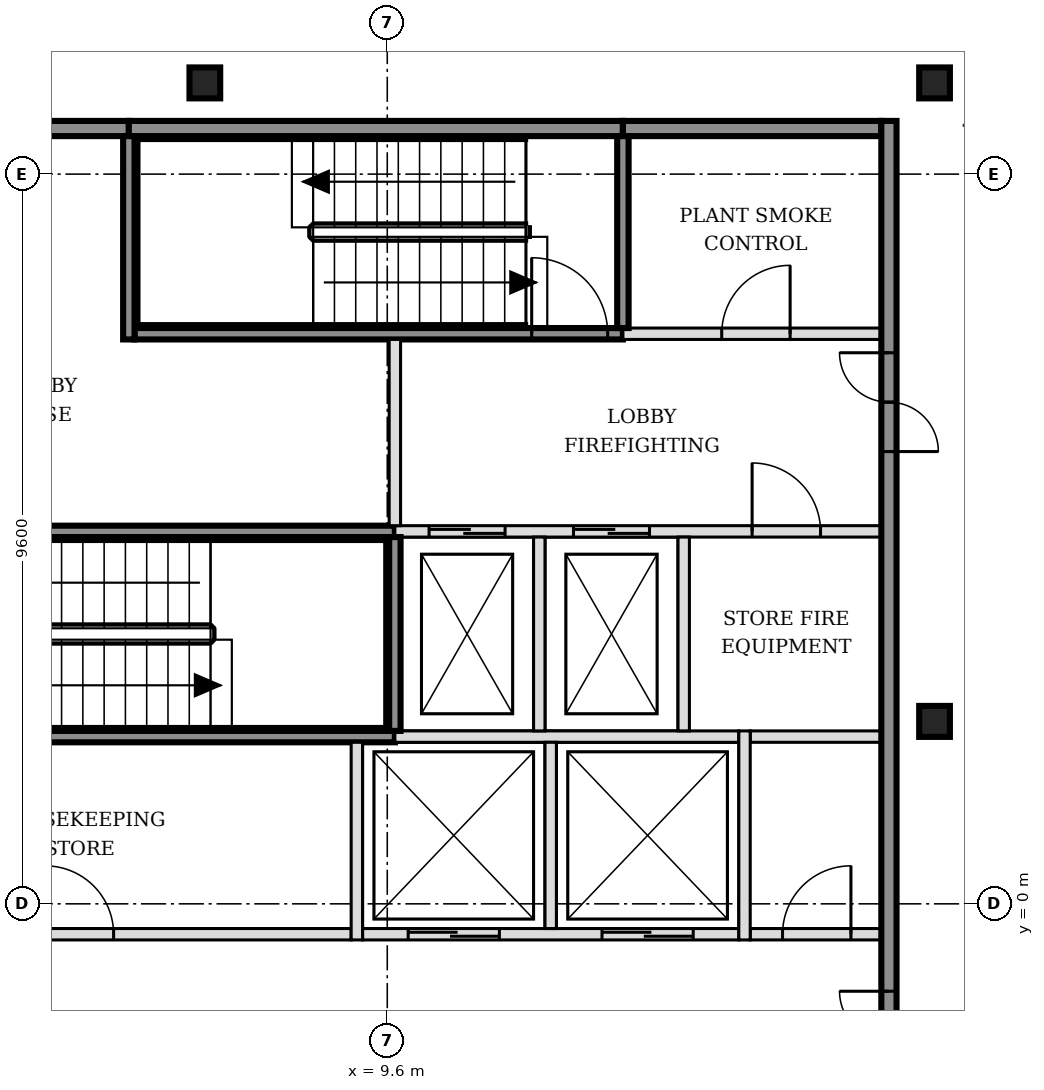
"""IFC4 building model, lengths in metres.
Left out: names, types, materials, properties, quantities, classifications, styles, units other than length and angle.
Written with IfcOpenShell. Run it as: python <this file> out.ifc"""

import sys

from ifc_helpers import new_model, si_unit, direction, frame, frame_2d, origin, origin_2d, place, context, subcontext, project, spatial, rectangle, i_section, extrude, element, fill, save


model = new_model("IFC4")
c1 = context("Model", 3, precision=1e-05, world=origin(), true_north=direction((0.0, 1.0)))
c2 = subcontext(c1, "Body", "Model", "MODEL_VIEW")
j1 = project(units=[si_unit("LENGTHUNIT", "METRE"), si_unit("PLANEANGLEUNIT", "RADIAN")], contexts=[c1])
p1 = place(None, origin())
s1 = spatial("IfcSite", under=j1, at=p1, CompositionType="ELEMENT")
p2 = place(p1, origin())
s2 = spatial("IfcBuilding", under=s1, at=p2, CompositionType="ELEMENT")
p3 = place(p2, frame((0.0, 0.0, 228.6)))
s3 = spatial("IfcBuildingStorey", under=s2, at=p3, CompositionType="ELEMENT", Elevation=228.6)
for number, where, z_axis, x_axis in (
    (1, (16.8, 2.4, -0.15), (0.0, 0.0, 1.0), (1.0, 0.0, 0.0)),
    (2, (7.2, 10.8, -0.15), (0.0, 0.0, 1.0), (1.0, 0.0, 0.0)),
    (3, (16.8, 10.8, -0.15), (0.0, 0.0, 1.0), (1.0, 0.0, 0.0)),
):
    element("IfcColumn", number, at=place(p3, frame(where, z_axis=z_axis, x_axis=x_axis)), inside=s3, PredefinedType="COLUMN", context=c2, shape_type="SweptSolid", body=[
        extrude(i_section(OverallWidth=0.404, OverallDepth=0.407, WebThickness=0.027, FlangeThickness=0.044, FilletRadius=0.015, at=origin_2d()), origin(), (0.0, 0.0, 1.0), 3.6),
    ])
p4 = place(p3, frame((-1.7, -0.4, 0.0), z_axis=(0.0, 0.0, 1.0), x_axis=(1.0, 0.0, 0.0)))
e4 = element("IfcWall", 4, at=p4, inside=s3, PredefinedType="PARTITIONING", context=c2, shape_type="SweptSolid", body=[
    extrude(rectangle(XDim=10.825, YDim=0.15, at=frame_2d((5.413, 0.0))), origin(), (0.0, 0.0, 1.0), 3.45),
])
p5 = place(p4, frame((1.3, 0.0, 0.0)))
e5 = element("IfcOpeningElement", 5, at=p5, cuts=e4, PredefinedType="OPENING", context=c2, shape_type="SweptSolid", body=[
    extrude(rectangle(XDim=0.9, YDim=2.1, at=frame_2d((0.45, 1.05))), frame((0.0, 0.085, 0.0), z_axis=(0.0, -1.0, 0.0), x_axis=(1.0, 0.0, 0.0)), (0.0, 0.0, 1.0), 0.17),
])
p6 = place(p4, frame((6.8, 0.0, 0.0)))
e6 = element("IfcOpeningElement", 6, at=p6, cuts=e4, PredefinedType="OPENING", context=c2, shape_type="SweptSolid", body=[
    extrude(rectangle(XDim=0.9, YDim=2.1, at=frame_2d((0.45, 1.05))), frame((0.0, 0.085, 0.0), z_axis=(0.0, -1.0, 0.0), x_axis=(1.0, 0.0, 0.0)), (0.0, 0.0, 1.0), 0.17),
])
p7 = place(p3, frame((9.275, -0.4, 0.0), z_axis=(0.0, 0.0, 1.0), x_axis=(1.0, 0.0, 0.0)))
e7 = element("IfcWall", 7, at=p7, inside=s3, PredefinedType="SOLIDWALL", context=c2, shape_type="SweptSolid", body=[
    extrude(rectangle(XDim=4.95, YDim=0.15, at=frame_2d((2.475, 0.0))), origin(), (0.0, 0.0, 1.0), 3.45),
])
p8 = place(p7, frame((0.6, 0.0, 0.0)))
e8 = element("IfcOpeningElement", 8, at=p8, cuts=e7, PredefinedType="OPENING", context=c2, shape_type="SweptSolid", body=[
    extrude(rectangle(XDim=1.2, YDim=2.1, at=frame_2d((0.6, 1.05))), frame((0.0, 0.085, 0.0), z_axis=(0.0, -1.0, 0.0), x_axis=(1.0, 0.0, 0.0)), (0.0, 0.0, 1.0), 0.17),
])
p9 = place(p7, frame((3.15, 0.0, 0.0)))
e9 = element("IfcOpeningElement", 9, at=p9, cuts=e7, PredefinedType="OPENING", context=c2, shape_type="SweptSolid", body=[
    extrude(rectangle(XDim=1.2, YDim=2.1, at=frame_2d((0.6, 1.05))), frame((0.0, 0.085, 0.0), z_axis=(0.0, -1.0, 0.0), x_axis=(1.0, 0.0, 0.0)), (0.0, 0.0, 1.0), 0.17),
])
p10 = place(p3, frame((14.375, -0.4, 0.0), z_axis=(0.0, 0.0, 1.0), x_axis=(1.0, 0.0, 0.0)))
e10 = element("IfcWall", 10, at=p10, inside=s3, PredefinedType="PARTITIONING", context=c2, shape_type="SweptSolid", body=[
    extrude(rectangle(XDim=1.725, YDim=0.15, at=frame_2d((0.863, 0.0))), origin(), (0.0, 0.0, 1.0), 3.45),
])
p11 = place(p10, frame((0.425, 0.0, 0.0)))
e11 = element("IfcOpeningElement", 11, at=p11, cuts=e10, PredefinedType="OPENING", context=c2, shape_type="SweptSolid", body=[
    extrude(rectangle(XDim=0.9, YDim=2.1, at=frame_2d((0.45, 1.05))), frame((0.0, 0.085, 0.0), z_axis=(0.0, -1.0, 0.0), x_axis=(1.0, 0.0, 0.0)), (0.0, 0.0, 1.0), 0.17),
])
p12 = place(p3, frame((3.2, 2.2, 0.0), z_axis=(0.0, 0.0, 1.0), x_axis=(1.0, 0.0, 0.0)))
e12 = element("IfcWall", 12, at=p12, inside=s3, PredefinedType="SOLIDWALL", context=c2, shape_type="SweptSolid", body=[
    extrude(rectangle(XDim=6.5, YDim=0.15, at=frame_2d((3.25, 0.0))), origin(), (0.0, 0.0, 1.0), 3.45),
])
p13 = place(p3, frame((9.7, 2.2, 0.0), z_axis=(0.0, 0.0, 1.0), x_axis=(1.0, 0.0, 0.0)))
e13 = element("IfcWall", 13, at=p13, inside=s3, PredefinedType="SOLIDWALL", context=c2, shape_type="SweptSolid", body=[
    extrude(rectangle(XDim=4.525, YDim=0.15, at=frame_2d((2.263, 0.0))), origin(), (0.0, 0.0, 1.0), 3.45),
])
p14 = place(p3, frame((14.375, 2.2, 0.0), z_axis=(0.0, 0.0, 1.0), x_axis=(1.0, 0.0, 0.0)))
e14 = element("IfcWall", 14, at=p14, inside=s3, PredefinedType="PARTITIONING", context=c2, shape_type="SweptSolid", body=[
    extrude(rectangle(XDim=1.725, YDim=0.15, at=frame_2d((0.863, 0.0))), origin(), (0.0, 0.0, 1.0), 3.45),
])
p15 = place(p3, frame((3.2, 4.9, 0.0), z_axis=(0.0, 0.0, 1.0), x_axis=(1.0, 0.0, 0.0)))
e15 = element("IfcWall", 15, at=p15, inside=s3, PredefinedType="SOLIDWALL", context=c2, shape_type="SweptSolid", body=[
    extrude(rectangle(XDim=6.5, YDim=0.15, at=frame_2d((3.25, 0.0))), origin(), (0.0, 0.0, 1.0), 3.45),
])
p16 = place(p15, frame((0.175, 0.0, 0.0)))
e16 = element("IfcOpeningElement", 16, at=p16, cuts=e15, PredefinedType="OPENING", context=c2, shape_type="SweptSolid", body=[
    extrude(rectangle(XDim=1.0, YDim=2.1, at=frame_2d((0.5, 1.05))), frame((0.0, 0.085, 0.0), z_axis=(0.0, -1.0, 0.0), x_axis=(1.0, 0.0, 0.0)), (0.0, 0.0, 1.0), 0.17),
])
p17 = place(p3, frame((9.7, 4.9, 0.0), z_axis=(0.0, 0.0, 1.0), x_axis=(1.0, 0.0, 0.0)))
e17 = element("IfcWall", 17, at=p17, inside=s3, PredefinedType="SOLIDWALL", context=c2, shape_type="SweptSolid", body=[
    extrude(rectangle(XDim=6.4, YDim=0.15, at=frame_2d((3.2, 0.0))), origin(), (0.0, 0.0, 1.0), 3.45),
])
p18 = place(p17, frame((0.45, 0.0, 0.0)))
e18 = element("IfcOpeningElement", 18, at=p18, cuts=e17, PredefinedType="OPENING", context=c2, shape_type="SweptSolid", body=[
    extrude(rectangle(XDim=1.0, YDim=2.1, at=frame_2d((0.5, 1.05))), frame((0.0, 0.085, 0.0), z_axis=(0.0, -1.0, 0.0), x_axis=(1.0, 0.0, 0.0)), (0.0, 0.0, 1.0), 0.17),
])
p19 = place(p17, frame((2.35, 0.0, 0.0)))
e19 = element("IfcOpeningElement", 19, at=p19, cuts=e17, PredefinedType="OPENING", context=c2, shape_type="SweptSolid", body=[
    extrude(rectangle(XDim=1.0, YDim=2.1, at=frame_2d((0.5, 1.05))), frame((0.0, 0.085, 0.0), z_axis=(0.0, -1.0, 0.0), x_axis=(1.0, 0.0, 0.0)), (0.0, 0.0, 1.0), 0.17),
])
p20 = place(p17, frame((4.7, 0.0, 0.0)))
e20 = element("IfcOpeningElement", 20, at=p20, cuts=e17, PredefinedType="OPENING", context=c2, shape_type="SweptSolid", body=[
    extrude(rectangle(XDim=0.9, YDim=2.1, at=frame_2d((0.45, 1.05))), frame((0.0, 0.085, 0.0), z_axis=(0.0, -1.0, 0.0), x_axis=(1.0, 0.0, 0.0)), (0.0, 0.0, 1.0), 0.17),
])
p21 = place(p3, frame((6.275, 7.5, 0.0), z_axis=(0.0, 0.0, 1.0), x_axis=(1.0, 0.0, 0.0)))
e21 = element("IfcWall", 21, at=p21, inside=s3, PredefinedType="SOLIDWALL", context=c2, shape_type="SweptSolid", body=[
    extrude(rectangle(XDim=6.425, YDim=0.15, at=frame_2d((3.212, 0.0))), origin(), (0.0, 0.0, 1.0), 3.45),
])
p22 = place(p21, frame((5.225, 0.0, 0.0)))
e22 = element("IfcOpeningElement", 22, at=p22, cuts=e21, PredefinedType="OPENING", context=c2, shape_type="SweptSolid", body=[
    extrude(rectangle(XDim=1.0, YDim=2.1, at=frame_2d((0.5, 1.05))), frame((0.0, 0.085, 0.0), z_axis=(0.0, -1.0, 0.0), x_axis=(1.0, 0.0, 0.0)), (0.0, 0.0, 1.0), 0.17),
])
p23 = place(p3, frame((12.7, 7.5, 0.0), z_axis=(0.0, 0.0, 1.0), x_axis=(1.0, 0.0, 0.0)))
e23 = element("IfcWall", 23, at=p23, inside=s3, PredefinedType="SOLIDWALL", context=c2, shape_type="SweptSolid", body=[
    extrude(rectangle(XDim=3.4, YDim=0.15, at=frame_2d((1.7, 0.0))), origin(), (0.0, 0.0, 1.0), 3.45),
])
p24 = place(p23, frame((1.3, 0.0, 0.0)))
e24 = element("IfcOpeningElement", 24, at=p24, cuts=e23, PredefinedType="OPENING", context=c2, shape_type="SweptSolid", body=[
    extrude(rectangle(XDim=0.9, YDim=2.1, at=frame_2d((0.45, 1.05))), frame((0.0, 0.085, 0.0), z_axis=(0.0, -1.0, 0.0), x_axis=(1.0, 0.0, 0.0)), (0.0, 0.0, 1.0), 0.17),
])
p25 = place(p3, frame((-1.7, 10.2, 0.0), z_axis=(0.0, 0.0, 1.0), x_axis=(1.0, 0.0, 0.0)))
e25 = element("IfcWall", 25, at=p25, inside=s3, PredefinedType="SOLIDWALL", context=c2, shape_type="SweptSolid", body=[
    extrude(rectangle(XDim=7.9, YDim=0.2, at=frame_2d((3.95, 0.0))), origin(), (0.0, 0.0, 1.0), 3.45),
])
p26 = place(p3, frame((6.2, 10.2, 0.0), z_axis=(0.0, 0.0, 1.0), x_axis=(1.0, 0.0, 0.0)))
e26 = element("IfcWall", 26, at=p26, inside=s3, PredefinedType="SOLIDWALL", context=c2, shape_type="SweptSolid", body=[
    extrude(rectangle(XDim=6.5, YDim=0.2, at=frame_2d((3.25, 0.0))), origin(), (0.0, 0.0, 1.0), 3.45),
])
p27 = place(p3, frame((12.7, 10.2, 0.0), z_axis=(0.0, 0.0, 1.0), x_axis=(1.0, 0.0, 0.0)))
e27 = element("IfcWall", 27, at=p27, inside=s3, PredefinedType="SOLIDWALL", context=c2, shape_type="SweptSolid", body=[
    extrude(rectangle(XDim=3.4, YDim=0.2, at=frame_2d((1.7, 0.0))), origin(), (0.0, 0.0, 1.0), 3.45),
])
p28 = place(p3, frame((6.2, 7.425, 0.0), z_axis=(0.0, 0.0, 1.0), x_axis=(0.0, 1.0, 0.0)))
e28 = element("IfcWall", 28, at=p28, inside=s3, PredefinedType="SOLIDWALL", context=c2, shape_type="SweptSolid", body=[
    extrude(rectangle(XDim=2.675, YDim=0.15, at=frame_2d((1.337, 0.0))), origin(), (0.0, 0.0, 1.0), 3.45),
])
p29 = place(p3, frame((9.2, -0.475, 0.0), z_axis=(0.0, 0.0, 1.0), x_axis=(0.0, 1.0, 0.0)))
e29 = element("IfcWall", 29, at=p29, inside=s3, PredefinedType="SOLIDWALL", context=c2, shape_type="SweptSolid", body=[
    extrude(rectangle(XDim=2.6, YDim=0.15, at=frame_2d((1.3, 0.0))), origin(), (0.0, 0.0, 1.0), 3.45),
])
p30 = place(p3, frame((9.7, 2.275, 0.0), z_axis=(0.0, 0.0, 1.0), x_axis=(0.0, 1.0, 0.0)))
e30 = element("IfcWall", 30, at=p30, inside=s3, PredefinedType="SOLIDWALL", context=c2, shape_type="SweptSolid", body=[
    extrude(rectangle(XDim=2.55, YDim=0.15, at=frame_2d((1.275, 0.0))), origin(), (0.0, 0.0, 1.0), 3.45),
])
p31 = place(p3, frame((9.7, 4.975, 0.0), z_axis=(0.0, 0.0, 1.0), x_axis=(0.0, 1.0, 0.0)))
e31 = element("IfcWall", 31, at=p31, inside=s3, PredefinedType="SOLIDWALL", context=c2, shape_type="SweptSolid", body=[
    extrude(rectangle(XDim=2.45, YDim=0.15, at=frame_2d((1.225, 0.0))), origin(), (0.0, 0.0, 1.0), 3.45),
])
p32 = place(p3, frame((11.6, 2.275, 0.0), z_axis=(0.0, 0.0, 1.0), x_axis=(0.0, 1.0, 0.0)))
e32 = element("IfcWall", 32, at=p32, inside=s3, PredefinedType="SOLIDWALL", context=c2, shape_type="SweptSolid", body=[
    extrude(rectangle(XDim=2.55, YDim=0.15, at=frame_2d((1.275, 0.0))), origin(), (0.0, 0.0, 1.0), 3.45),
])
p33 = place(p3, frame((11.75, -0.325, 0.0), z_axis=(0.0, 0.0, 1.0), x_axis=(0.0, 1.0, 0.0)))
e33 = element("IfcWall", 33, at=p33, inside=s3, PredefinedType="SOLIDWALL", context=c2, shape_type="SweptSolid", body=[
    extrude(rectangle(XDim=2.45, YDim=0.15, at=frame_2d((1.225, 0.0))), origin(), (0.0, 0.0, 1.0), 3.45),
])
p34 = place(p3, frame((12.7, 7.575, 0.0), z_axis=(0.0, 0.0, 1.0), x_axis=(0.0, 1.0, 0.0)))
e34 = element("IfcWall", 34, at=p34, inside=s3, PredefinedType="SOLIDWALL", context=c2, shape_type="SweptSolid", body=[
    extrude(rectangle(XDim=2.525, YDim=0.15, at=frame_2d((1.263, 0.0))), origin(), (0.0, 0.0, 1.0), 3.45),
])
p35 = place(p3, frame((13.5, 2.275, 0.0), z_axis=(0.0, 0.0, 1.0), x_axis=(0.0, 1.0, 0.0)))
e35 = element("IfcWall", 35, at=p35, inside=s3, PredefinedType="SOLIDWALL", context=c2, shape_type="SweptSolid", body=[
    extrude(rectangle(XDim=2.55, YDim=0.15, at=frame_2d((1.275, 0.0))), origin(), (0.0, 0.0, 1.0), 3.45),
])
p36 = place(p3, frame((14.3, -0.475, 0.0), z_axis=(0.0, 0.0, 1.0), x_axis=(0.0, 1.0, 0.0)))
e36 = element("IfcWall", 36, at=p36, inside=s3, PredefinedType="SOLIDWALL", context=c2, shape_type="SweptSolid", body=[
    extrude(rectangle(XDim=2.75, YDim=0.15, at=frame_2d((1.375, 0.0))), origin(), (0.0, 0.0, 1.0), 3.45),
])
p37 = place(p3, frame((16.2, -5.5, 0.0), z_axis=(0.0, 0.0, 1.0), x_axis=(0.0, 1.0, 0.0)))
e37 = element("IfcWall", 37, at=p37, inside=s3, PredefinedType="SOLIDWALL", context=c2, shape_type="SweptSolid", body=[
    extrude(rectangle(XDim=15.8, YDim=0.2, at=frame_2d((7.9, 0.0))), origin(), (0.0, 0.0, 1.0), 3.45),
])
p38 = place(p37, frame((3.05, 0.0, 0.0)))
e38 = element("IfcOpeningElement", 38, at=p38, cuts=e37, PredefinedType="OPENING", context=c2, shape_type="SweptSolid", body=[
    extrude(rectangle(XDim=1.3, YDim=2.1, at=frame_2d((0.65, 1.05))), frame((0.0, 0.11, 0.0), z_axis=(0.0, -1.0, 0.0), x_axis=(1.0, 0.0, 0.0)), (0.0, 0.0, 1.0), 0.22),
])
p39 = place(p37, frame((11.45, 0.0, 0.0)))
e39 = element("IfcOpeningElement", 39, at=p39, cuts=e37, PredefinedType="OPENING", context=c2, shape_type="SweptSolid", body=[
    extrude(rectangle(XDim=1.3, YDim=2.1, at=frame_2d((0.65, 1.05))), frame((0.0, 0.11, 0.0), z_axis=(0.0, -1.0, 0.0), x_axis=(1.0, 0.0, 0.0)), (0.0, 0.0, 1.0), 0.22),
])
p40 = place(p3, frame((16.722, -14.272, 0.0), z_axis=(0.0, 0.0, 1.0), x_axis=(0.707106781187, 0.707106781187, 0.0)))
e40 = element("IfcWall", 40, at=p40, inside=s3, PredefinedType="PARTITIONING", context=c2, shape_type="SweptSolid", body=[
    extrude(rectangle(XDim=20.049, YDim=0.15, at=frame_2d((10.025, 0.0))), origin(), (0.0, 0.0, 1.0), 2.73),
])
p41 = place(p40, frame((4.892, 0.0, 0.0)))
e41 = element("IfcOpeningElement", 41, at=p41, cuts=e40, PredefinedType="OPENING", context=c2, shape_type="SweptSolid", body=[
    extrude(rectangle(XDim=0.9, YDim=2.1, at=frame_2d((0.45, 1.05))), frame((0.0, 0.085, 0.0), z_axis=(0.0, -1.0, 0.0), x_axis=(1.0, 0.0, 0.0)), (0.0, 0.0, 1.0), 0.17),
])
p42 = place(p40, frame((10.042, 0.0, 0.0)))
e42 = element("IfcOpeningElement", 42, at=p42, cuts=e40, PredefinedType="OPENING", context=c2, shape_type="SweptSolid", body=[
    extrude(rectangle(XDim=0.9, YDim=2.1, at=frame_2d((0.45, 1.05))), frame((0.0, 0.085, 0.0), z_axis=(0.0, -1.0, 0.0), x_axis=(1.0, 0.0, 0.0)), (0.0, 0.0, 1.0), 0.17),
])
p43 = place(p40, frame((14.443, 0.0, 0.0)))
e43 = element("IfcOpeningElement", 43, at=p43, cuts=e40, PredefinedType="OPENING", context=c2, shape_type="SweptSolid", body=[
    extrude(rectangle(XDim=0.9, YDim=2.1, at=frame_2d((0.45, 1.05))), frame((0.0, 0.085, 0.0), z_axis=(0.0, -1.0, 0.0), x_axis=(1.0, 0.0, 0.0)), (0.0, 0.0, 1.0), 0.17),
])
p44 = place(p40, frame((17.837, 0.0, 0.0)))
e44 = element("IfcOpeningElement", 44, at=p44, cuts=e40, PredefinedType="OPENING", context=c2, shape_type="SweptSolid", body=[
    extrude(rectangle(XDim=0.9, YDim=2.1, at=frame_2d((0.45, 1.05))), frame((0.0, 0.085, 0.0), z_axis=(0.0, -1.0, 0.0), x_axis=(1.0, 0.0, 0.0)), (0.0, 0.0, 1.0), 0.17),
])
p45 = place(p8, origin())
e45 = element("IfcDoor", 45, at=p45, inside=s3, OperationType="DOUBLE_DOOR_SLIDING", PredefinedType="DOOR", context=c2, shape_type="SweptSolid", body=[
    extrude(rectangle(XDim=1.2, YDim=2.1, at=frame_2d((0.6, 1.05))), frame((0.0, 0.025, 0.0), z_axis=(0.0, -1.0, 0.0), x_axis=(1.0, 0.0, 0.0)), (0.0, 0.0, 1.0), 0.05),
])
fill(e8, e45)
p46 = place(p9, origin())
e46 = element("IfcDoor", 46, at=p46, inside=s3, OperationType="DOUBLE_DOOR_SLIDING", PredefinedType="DOOR", context=c2, shape_type="SweptSolid", body=[
    extrude(rectangle(XDim=1.2, YDim=2.1, at=frame_2d((0.6, 1.05))), frame((0.0, 0.025, 0.0), z_axis=(0.0, -1.0, 0.0), x_axis=(1.0, 0.0, 0.0)), (0.0, 0.0, 1.0), 0.05),
])
fill(e9, e46)
p47 = place(p18, origin())
e47 = element("IfcDoor", 47, at=p47, inside=s3, OperationType="DOUBLE_DOOR_SLIDING", PredefinedType="DOOR", context=c2, shape_type="SweptSolid", body=[
    extrude(rectangle(XDim=1.0, YDim=2.1, at=frame_2d((0.5, 1.05))), frame((0.0, 0.025, 0.0), z_axis=(0.0, -1.0, 0.0), x_axis=(1.0, 0.0, 0.0)), (0.0, 0.0, 1.0), 0.05),
])
fill(e18, e47)
p48 = place(p19, origin())
e48 = element("IfcDoor", 48, at=p48, inside=s3, OperationType="DOUBLE_DOOR_SLIDING", PredefinedType="DOOR", context=c2, shape_type="SweptSolid", body=[
    extrude(rectangle(XDim=1.0, YDim=2.1, at=frame_2d((0.5, 1.05))), frame((0.0, 0.025, 0.0), z_axis=(0.0, -1.0, 0.0), x_axis=(1.0, 0.0, 0.0)), (0.0, 0.0, 1.0), 0.05),
])
fill(e19, e48)
p49 = place(p22, origin())
e49 = element("IfcDoor", 49, at=p49, inside=s3, OperationType="SINGLE_SWING_LEFT", PredefinedType="DOOR", context=c2, shape_type="SweptSolid", body=[
    extrude(rectangle(XDim=1.0, YDim=2.1, at=frame_2d((0.5, 1.05))), frame((0.0, 0.025, 0.0), z_axis=(0.0, -1.0, 0.0), x_axis=(1.0, 0.0, 0.0)), (0.0, 0.0, 1.0), 0.05),
])
fill(e22, e49)
p50 = place(p38, origin())
e50 = element("IfcDoor", 50, at=p50, inside=s3, OperationType="DOUBLE_DOOR_SINGLE_SWING", PredefinedType="DOOR", context=c2, shape_type="SweptSolid", body=[
    extrude(rectangle(XDim=1.3, YDim=2.1, at=frame_2d((0.65, 1.05))), frame((0.0, 0.025, 0.0), z_axis=(0.0, -1.0, 0.0), x_axis=(1.0, 0.0, 0.0)), (0.0, 0.0, 1.0), 0.05),
])
fill(e38, e50)
p51 = place(p39, origin())
e51 = element("IfcDoor", 51, at=p51, inside=s3, OperationType="DOUBLE_DOOR_SINGLE_SWING", PredefinedType="DOOR", context=c2, shape_type="SweptSolid", body=[
    extrude(rectangle(XDim=1.3, YDim=2.1, at=frame_2d((0.65, 1.05))), frame((0.0, 0.025, 0.0), z_axis=(0.0, -1.0, 0.0), x_axis=(1.0, 0.0, 0.0)), (0.0, 0.0, 1.0), 0.05),
])
fill(e39, e51)
p52 = place(p11, origin())
e52 = element("IfcDoor", 52, at=p52, inside=s3, OperationType="SINGLE_SWING_RIGHT", PredefinedType="DOOR", context=c2, shape_type="SweptSolid", body=[
    extrude(rectangle(XDim=0.9, YDim=2.1, at=frame_2d((0.45, 1.05))), frame((0.0, 0.025, 0.0), z_axis=(0.0, -1.0, 0.0), x_axis=(1.0, 0.0, 0.0)), (0.0, 0.0, 1.0), 0.05),
])
fill(e11, e52)
p53 = place(p20, origin())
e53 = element("IfcDoor", 53, at=p53, inside=s3, OperationType="SINGLE_SWING_LEFT", PredefinedType="DOOR", context=c2, shape_type="SweptSolid", body=[
    extrude(rectangle(XDim=0.9, YDim=2.1, at=frame_2d((0.45, 1.05))), frame((0.0, 0.025, 0.0), z_axis=(0.0, -1.0, 0.0), x_axis=(1.0, 0.0, 0.0)), (0.0, 0.0, 1.0), 0.05),
])
fill(e20, e53)
p54 = place(p24, origin())
e54 = element("IfcDoor", 54, at=p54, inside=s3, OperationType="SINGLE_SWING_RIGHT", PredefinedType="DOOR", context=c2, shape_type="SweptSolid", body=[
    extrude(rectangle(XDim=0.9, YDim=2.1, at=frame_2d((0.45, 1.05))), frame((0.0, 0.025, 0.0), z_axis=(0.0, -1.0, 0.0), x_axis=(1.0, 0.0, 0.0)), (0.0, 0.0, 1.0), 0.05),
])
fill(e24, e54)
p55 = place(p6, origin())
e55 = element("IfcDoor", 55, at=p55, inside=s3, OperationType="SINGLE_SWING_LEFT", PredefinedType="DOOR", context=c2, shape_type="SweptSolid", body=[
    extrude(rectangle(XDim=0.9, YDim=2.1, at=frame_2d((0.45, 1.05))), frame((0.0, 0.025, 0.0), z_axis=(0.0, -1.0, 0.0), x_axis=(1.0, 0.0, 0.0)), (0.0, 0.0, 1.0), 0.05),
])
fill(e6, e55)
save(model, sys.argv[1])
